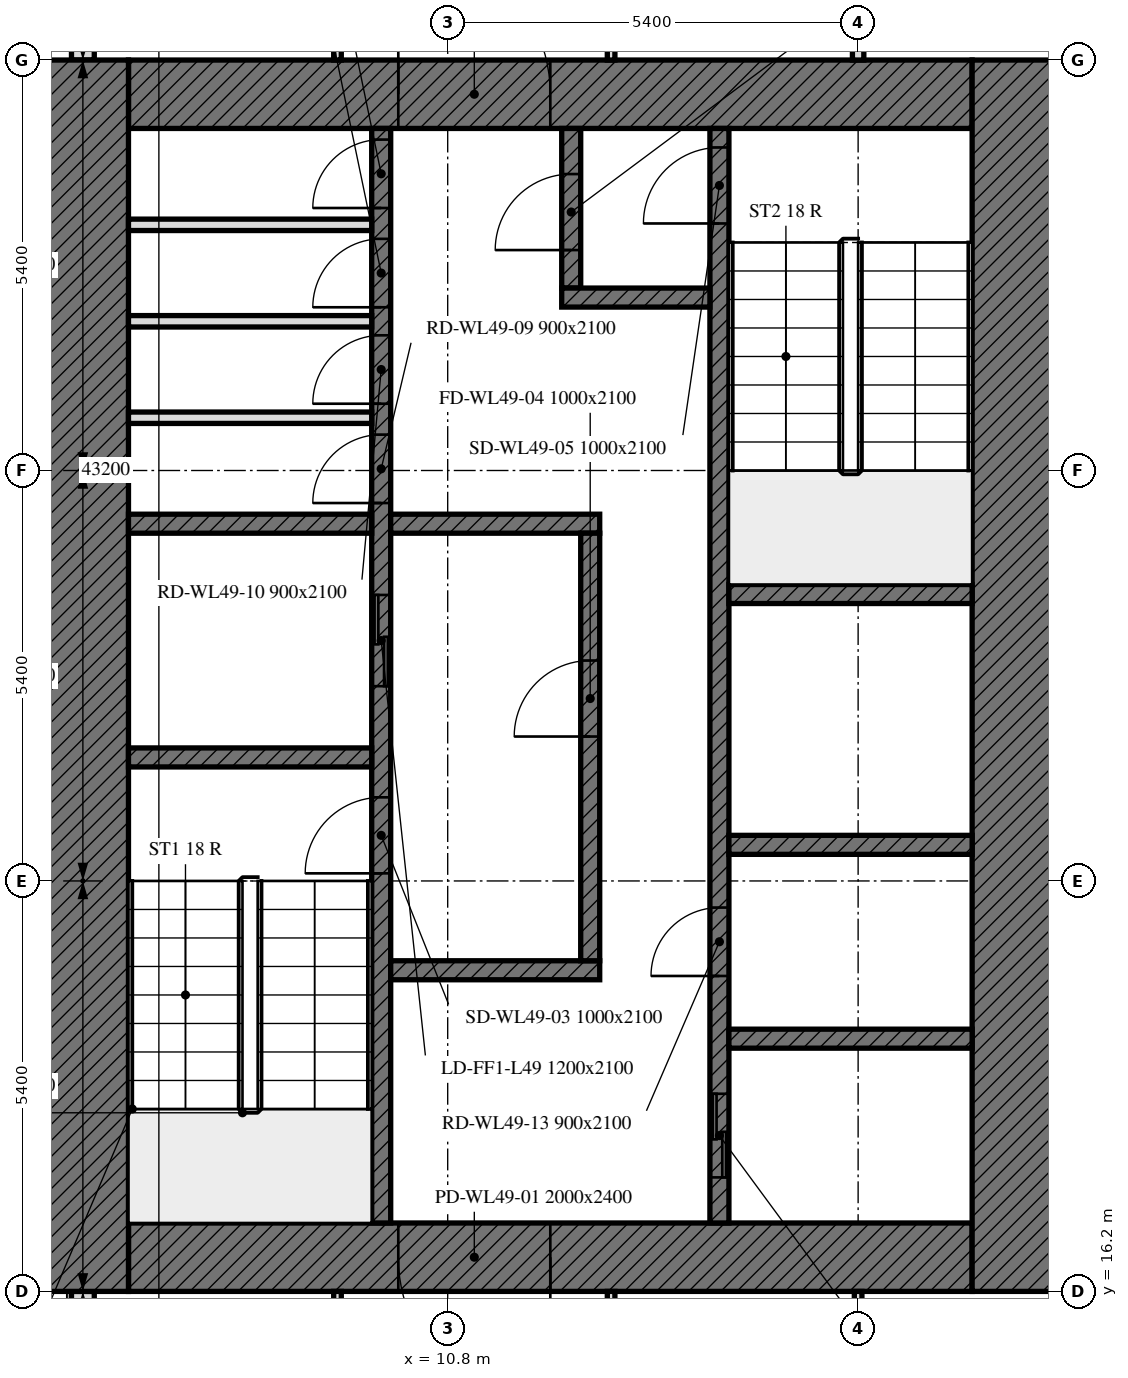
"""IFC4 building model, lengths in metres.
Left out: names, types, materials, properties, quantities, classifications, styles, units other than length and angle.
Written with IfcOpenShell. Run it as: python <this file> out.ifc"""

import sys

from ifc_helpers import new_model, si_unit, direction, frame, frame_2d, origin, place, context, subcontext, project, spatial, rectangle, extrude, element, fill, save


model = new_model("IFC4")
c1 = context("Model", 3, precision=1e-05, world=origin(), true_north=direction((0.0, 1.0)))
c2 = subcontext(c1, "Body", "Model", "MODEL_VIEW")
j1 = project(units=[si_unit("LENGTHUNIT", "METRE"), si_unit("PLANEANGLEUNIT", "RADIAN")], contexts=[c1])
p1 = place(None, origin())
s1 = spatial("IfcSite", under=j1, at=p1, CompositionType="ELEMENT")
p2 = place(p1, origin())
s2 = spatial("IfcBuilding", under=s1, at=p2, CompositionType="ELEMENT")
p3 = place(p2, frame((0.0, 0.0, 200.5)))
s3 = spatial("IfcBuildingStorey", under=s2, at=p3, CompositionType="ELEMENT", Elevation=200.5)
p4 = place(p3, frame((6.0, 43.014, 0.0), z_axis=(0.0, 0.0, 1.0), x_axis=(0.0, -1.0, 0.0)))
e1 = element("IfcWall", 1, at=p4, inside=s3, PredefinedType="SOLIDWALL", context=c2, shape_type="SweptSolid", body=[
    extrude(rectangle(XDim=10.614, YDim=0.3, at=frame_2d((5.307, 0.0))), origin(), (0.0, 0.0, 1.0), 3.0),
])
p5 = place(p4, frame((1.164, 0.0, 0.9)))
e2 = element("IfcOpeningElement", 2, at=p5, cuts=e1, PredefinedType="OPENING", context=c2, shape_type="SweptSolid", body=[
    extrude(rectangle(XDim=1.1, YDim=1.7, at=frame_2d((0.55, 0.85))), frame((0.0, 0.16, 0.0), z_axis=(0.0, -1.0, 0.0), x_axis=(1.0, 0.0, 0.0)), (0.0, 0.0, 1.0), 0.32),
])
p6 = place(p4, frame((2.764, 0.0, 0.9)))
e3 = element("IfcOpeningElement", 3, at=p6, cuts=e1, PredefinedType="OPENING", context=c2, shape_type="SweptSolid", body=[
    extrude(rectangle(XDim=1.1, YDim=1.7, at=frame_2d((0.55, 0.85))), frame((0.0, 0.16, 0.0), z_axis=(0.0, -1.0, 0.0), x_axis=(1.0, 0.0, 0.0)), (0.0, 0.0, 1.0), 0.32),
])
p7 = place(p4, frame((6.564, 0.0, 0.9)))
e4 = element("IfcOpeningElement", 4, at=p7, cuts=e1, PredefinedType="OPENING", context=c2, shape_type="SweptSolid", body=[
    extrude(rectangle(XDim=1.1, YDim=1.7, at=frame_2d((0.55, 0.85))), frame((0.0, 0.16, 0.0), z_axis=(0.0, -1.0, 0.0), x_axis=(1.0, 0.0, 0.0)), (0.0, 0.0, 1.0), 0.32),
])
p8 = place(p4, frame((8.164, 0.0, 0.9)))
e5 = element("IfcOpeningElement", 5, at=p8, cuts=e1, PredefinedType="OPENING", context=c2, shape_type="SweptSolid", body=[
    extrude(rectangle(XDim=1.1, YDim=1.7, at=frame_2d((0.55, 0.85))), frame((0.0, 0.16, 0.0), z_axis=(0.0, -1.0, 0.0), x_axis=(1.0, 0.0, 0.0)), (0.0, 0.0, 1.0), 0.32),
])
p9 = place(p3, frame((6.0, 16.2, 0.0), z_axis=(0.0, 0.0, 1.0), x_axis=(0.0, -1.0, 0.0)))
e6 = element("IfcWall", 6, at=p9, inside=s3, PredefinedType="SOLIDWALL", context=c2, shape_type="SweptSolid", body=[
    extrude(rectangle(XDim=5.214, YDim=0.3, at=frame_2d((2.607, 0.0))), origin(), (0.0, 0.0, 1.0), 3.0),
])
p10 = place(p9, frame((1.35, 0.0, 0.9)))
e7 = element("IfcOpeningElement", 7, at=p10, cuts=e6, PredefinedType="OPENING", context=c2, shape_type="SweptSolid", body=[
    extrude(rectangle(XDim=1.1, YDim=1.7, at=frame_2d((0.55, 0.85))), frame((0.0, 0.16, 0.0), z_axis=(0.0, -1.0, 0.0), x_axis=(1.0, 0.0, 0.0)), (0.0, 0.0, 1.0), 0.32),
])
p11 = place(p9, frame((2.95, 0.0, 0.9)))
e8 = element("IfcOpeningElement", 8, at=p11, cuts=e6, PredefinedType="OPENING", context=c2, shape_type="SweptSolid", body=[
    extrude(rectangle(XDim=1.1, YDim=1.7, at=frame_2d((0.55, 0.85))), frame((0.0, 0.16, 0.0), z_axis=(0.0, -1.0, 0.0), x_axis=(1.0, 0.0, 0.0)), (0.0, 0.0, 1.0), 0.32),
])
p12 = place(p3, frame((17.7, 16.65, 0.0), z_axis=(0.0, 0.0, 1.0), x_axis=(-1.0, 0.0, 0.0)))
e9 = element("IfcWall", 9, at=p12, inside=s3, PredefinedType="SOLIDWALL", context=c2, shape_type="SweptSolid", body=[
    extrude(rectangle(XDim=11.1, YDim=0.9, at=frame_2d((5.55, 0.0))), origin(), (0.0, 0.0, 1.0), 3.0),
])
p13 = place(p12, frame((5.55, 0.0, 0.0)))
e10 = element("IfcOpeningElement", 10, at=p13, cuts=e9, PredefinedType="OPENING", context=c2, shape_type="SweptSolid", body=[
    extrude(rectangle(XDim=2.0, YDim=2.4, at=frame_2d((1.0, 1.2))), frame((0.0, 0.45, 0.0), z_axis=(0.0, -1.0, 0.0), x_axis=(1.0, 0.0, 0.0)), (0.0, 0.0, 1.0), 0.9),
])
p14 = place(p3, frame((6.6, 31.95, 0.0), z_axis=(0.0, 0.0, 1.0), x_axis=(1.0, 0.0, 0.0)))
e11 = element("IfcWall", 11, at=p14, inside=s3, PredefinedType="SOLIDWALL", context=c2, shape_type="SweptSolid", body=[
    extrude(rectangle(XDim=11.1, YDim=0.9, at=frame_2d((5.55, 0.0))), origin(), (0.0, 0.0, 1.0), 3.0),
])
p15 = place(p14, frame((3.55, 0.0, 0.0)))
e12 = element("IfcOpeningElement", 12, at=p15, cuts=e11, PredefinedType="OPENING", context=c2, shape_type="SweptSolid", body=[
    extrude(rectangle(XDim=2.0, YDim=2.4, at=frame_2d((1.0, 1.2))), frame((0.0, 0.45, 0.0), z_axis=(0.0, -1.0, 0.0), x_axis=(1.0, 0.0, 0.0)), (0.0, 0.0, 1.0), 0.9),
])
for number, where, z_axis, x_axis in (
    (13, (6.0, 16.2, 0.0), (0.0, 0.0, 1.0), (0.0, 1.0, 0.0)),
    (14, (18.3, 32.4, 0.0), (0.0, 0.0, 1.0), (0.0, -1.0, 0.0)),
):
    element("IfcWall", number, at=place(p3, frame(where, z_axis=z_axis, x_axis=x_axis)), inside=s3, PredefinedType="SOLIDWALL", context=c2, shape_type="SweptSolid", body=[
        extrude(rectangle(XDim=16.2, YDim=1.2, at=frame_2d((8.1, 0.0))), origin(), (0.0, 0.0, 1.0), 3.0),
    ])
p16 = place(p3, frame((9.925, 17.1, 0.0), z_axis=(0.0, 0.0, 1.0), x_axis=(0.0, 1.0, 0.0)))
e15 = element("IfcWall", 15, at=p16, inside=s3, PredefinedType="SOLIDWALL", context=c2, shape_type="SweptSolid", body=[
    extrude(rectangle(XDim=14.4, YDim=0.25, at=frame_2d((7.2, 0.0))), origin(), (0.0, 0.0, 1.0), 3.0),
])
p17 = place(p16, frame((4.6, 0.0, 0.0)))
e16 = element("IfcOpeningElement", 16, at=p17, cuts=e15, PredefinedType="OPENING", context=c2, shape_type="SweptSolid", body=[
    extrude(rectangle(XDim=1.0, YDim=2.1, at=frame_2d((0.5, 1.05))), frame((0.0, 0.125, 0.0), z_axis=(0.0, -1.0, 0.0), x_axis=(1.0, 0.0, 0.0)), (0.0, 0.0, 1.0), 0.25),
])
p18 = place(p16, frame((7.062, 0.0, 0.0)))
e17 = element("IfcOpeningElement", 17, at=p18, cuts=e15, PredefinedType="OPENING", context=c2, shape_type="SweptSolid", body=[
    extrude(rectangle(XDim=1.2, YDim=2.1, at=frame_2d((0.6, 1.05))), frame((0.0, 0.125, 0.0), z_axis=(0.0, -1.0, 0.0), x_axis=(1.0, 0.0, 0.0)), (0.0, 0.0, 1.0), 0.25),
])
p19 = place(p16, frame((9.472, 0.0, 0.0)))
e18 = element("IfcOpeningElement", 18, at=p19, cuts=e15, PredefinedType="OPENING", context=c2, shape_type="SweptSolid", body=[
    extrude(rectangle(XDim=0.9, YDim=2.1, at=frame_2d((0.45, 1.05))), frame((0.0, 0.125, 0.0), z_axis=(0.0, -1.0, 0.0), x_axis=(1.0, 0.0, 0.0)), (0.0, 0.0, 1.0), 0.25),
])
p20 = place(p16, frame((10.779, 0.0, 0.0)))
e19 = element("IfcOpeningElement", 19, at=p20, cuts=e15, PredefinedType="OPENING", context=c2, shape_type="SweptSolid", body=[
    extrude(rectangle(XDim=0.9, YDim=2.1, at=frame_2d((0.45, 1.05))), frame((0.0, 0.125, 0.0), z_axis=(0.0, -1.0, 0.0), x_axis=(1.0, 0.0, 0.0)), (0.0, 0.0, 1.0), 0.25),
])
p21 = place(p16, frame((12.048, 0.0, 0.0)))
e20 = element("IfcOpeningElement", 20, at=p21, cuts=e15, PredefinedType="OPENING", context=c2, shape_type="SweptSolid", body=[
    extrude(rectangle(XDim=0.9, YDim=2.1, at=frame_2d((0.45, 1.05))), frame((0.0, 0.125, 0.0), z_axis=(0.0, -1.0, 0.0), x_axis=(1.0, 0.0, 0.0)), (0.0, 0.0, 1.0), 0.25),
])
p22 = place(p16, frame((13.354, 0.0, 0.0)))
e21 = element("IfcOpeningElement", 21, at=p22, cuts=e15, PredefinedType="OPENING", context=c2, shape_type="SweptSolid", body=[
    extrude(rectangle(XDim=0.9, YDim=2.1, at=frame_2d((0.45, 1.05))), frame((0.0, 0.125, 0.0), z_axis=(0.0, -1.0, 0.0), x_axis=(1.0, 0.0, 0.0)), (0.0, 0.0, 1.0), 0.25),
])
p23 = place(p3, frame((14.375, 17.1, 0.0), z_axis=(0.0, 0.0, 1.0), x_axis=(0.0, 1.0, 0.0)))
e22 = element("IfcWall", 22, at=p23, inside=s3, PredefinedType="SOLIDWALL", context=c2, shape_type="SweptSolid", body=[
    extrude(rectangle(XDim=14.4, YDim=0.25, at=frame_2d((7.2, 0.0))), origin(), (0.0, 0.0, 1.0), 3.0),
])
p24 = place(p23, frame((13.15, 0.0, 0.0)))
e23 = element("IfcOpeningElement", 23, at=p24, cuts=e22, PredefinedType="OPENING", context=c2, shape_type="SweptSolid", body=[
    extrude(rectangle(XDim=1.0, YDim=2.1, at=frame_2d((0.5, 1.05))), frame((0.0, 0.125, 0.0), z_axis=(0.0, -1.0, 0.0), x_axis=(1.0, 0.0, 0.0)), (0.0, 0.0, 1.0), 0.25),
])
p25 = place(p23, frame((0.6, 0.0, 0.0)))
e24 = element("IfcOpeningElement", 24, at=p25, cuts=e22, PredefinedType="OPENING", context=c2, shape_type="SweptSolid", body=[
    extrude(rectangle(XDim=1.1, YDim=2.1, at=frame_2d((0.55, 1.05))), frame((0.0, 0.125, 0.0), z_axis=(0.0, -1.0, 0.0), x_axis=(1.0, 0.0, 0.0)), (0.0, 0.0, 1.0), 0.25),
])
p26 = place(p23, frame((3.25, 0.0, 0.0)))
e25 = element("IfcOpeningElement", 25, at=p26, cuts=e22, PredefinedType="OPENING", context=c2, shape_type="SweptSolid", body=[
    extrude(rectangle(XDim=0.9, YDim=2.1, at=frame_2d((0.45, 1.05))), frame((0.0, 0.125, 0.0), z_axis=(0.0, -1.0, 0.0), x_axis=(1.0, 0.0, 0.0)), (0.0, 0.0, 1.0), 0.25),
])
for number, where, z_axis, x_axis in (
    (26, (6.6, 23.225, 0.0), (0.0, 0.0, 1.0), (1.0, 0.0, 0.0)),
    (27, (14.5, 25.375, 0.0), (0.0, 0.0, 1.0), (1.0, 0.0, 0.0)),
    (28, (14.5, 22.075, 0.0), (0.0, 0.0, 1.0), (1.0, 0.0, 0.0)),
    (29, (6.6, 26.3, 0.0), (0.0, 0.0, 1.0), (1.0, 0.0, 0.0)),
):
    element("IfcWall", number, at=place(p3, frame(where, z_axis=z_axis, x_axis=x_axis)), inside=s3, PredefinedType="SOLIDWALL", context=c2, shape_type="SweptSolid", body=[
        extrude(rectangle(XDim=3.2, YDim=0.25, at=frame_2d((1.6, 0.0))), origin(), (0.0, 0.0, 1.0), 3.0),
    ])
for number, where, z_axis, x_axis in (
    (30, (10.05, 26.3, 0.0), (0.0, 0.0, 1.0), (1.0, 0.0, 0.0)),
    (31, (10.05, 20.425, 0.0), (0.0, 0.0, 1.0), (1.0, 0.0, 0.0)),
):
    element("IfcWall", number, at=place(p3, frame(where, z_axis=z_axis, x_axis=x_axis)), inside=s3, PredefinedType="SOLIDWALL", context=c2, shape_type="SweptSolid", body=[
        extrude(rectangle(XDim=2.75, YDim=0.25, at=frame_2d((1.375, 0.0))), origin(), (0.0, 0.0, 1.0), 3.0),
    ])
p27 = place(p3, frame((12.425, 29.4, 0.0), z_axis=(0.0, 0.0, 1.0), x_axis=(0.0, 1.0, 0.0)))
e32 = element("IfcWall", 32, at=p27, inside=s3, PredefinedType="SOLIDWALL", context=c2, shape_type="SweptSolid", body=[
    extrude(rectangle(XDim=2.1, YDim=0.25, at=frame_2d((1.05, 0.0))), origin(), (0.0, 0.0, 1.0), 3.0),
])
p28 = place(p27, frame((0.5, 0.0, 0.0)))
e33 = element("IfcOpeningElement", 33, at=p28, cuts=e32, PredefinedType="OPENING", context=c2, shape_type="SweptSolid", body=[
    extrude(rectangle(XDim=1.0, YDim=2.1, at=frame_2d((0.5, 1.05))), frame((0.0, 0.125, 0.0), z_axis=(0.0, -1.0, 0.0), x_axis=(1.0, 0.0, 0.0)), (0.0, 0.0, 1.0), 0.25),
])
p29 = place(p3, frame((12.3, 29.275, 0.0), z_axis=(0.0, 0.0, 1.0), x_axis=(1.0, 0.0, 0.0)))
e34 = element("IfcWall", 34, at=p29, inside=s3, PredefinedType="SOLIDWALL", context=c2, shape_type="SweptSolid", body=[
    extrude(rectangle(XDim=1.95, YDim=0.25, at=frame_2d((0.975, 0.0))), origin(), (0.0, 0.0, 1.0), 3.0),
])
p30 = place(p3, frame((12.675, 20.55, 0.0), z_axis=(0.0, 0.0, 1.0), x_axis=(0.0, 1.0, 0.0)))
e35 = element("IfcWall", 35, at=p30, inside=s3, PredefinedType="SOLIDWALL", context=c2, shape_type="SweptSolid", body=[
    extrude(rectangle(XDim=5.625, YDim=0.25, at=frame_2d((2.812, 0.0))), origin(), (0.0, 0.0, 1.0), 3.0),
])
p31 = place(p30, frame((2.95, 0.0, 0.0)))
e36 = element("IfcOpeningElement", 36, at=p31, cuts=e35, PredefinedType="OPENING", context=c2, shape_type="SweptSolid", body=[
    extrude(rectangle(XDim=1.0, YDim=2.1, at=frame_2d((0.5, 1.05))), frame((0.0, 0.125, 0.0), z_axis=(0.0, -1.0, 0.0), x_axis=(1.0, 0.0, 0.0)), (0.0, 0.0, 1.0), 0.25),
])
p32 = place(p3, frame((14.5, 19.525, 0.0), z_axis=(0.0, 0.0, 1.0), x_axis=(1.0, 0.0, 0.0)))
e37 = element("IfcWall", 37, at=p32, inside=s3, PredefinedType="SOLIDWALL", context=c2, shape_type="SweptSolid", body=[
    extrude(rectangle(XDim=3.2, YDim=0.25, at=frame_2d((1.6, 0.0))), origin(), (0.0, 0.0, 1.0), 3.0),
])
for number, where, z_axis, x_axis in (
    (38, (6.6, 27.694, 0.0), (0.0, 0.0, 1.0), (1.0, 0.0, 0.0)),
    (39, (6.6, 28.963, 0.0), (0.0, 0.0, 1.0), (1.0, 0.0, 0.0)),
    (40, (6.6, 30.232, 0.0), (0.0, 0.0, 1.0), (1.0, 0.0, 0.0)),
):
    element("IfcWall", number, at=place(p3, frame(where, z_axis=z_axis, x_axis=x_axis)), inside=s3, PredefinedType="PARTITIONING", context=c2, shape_type="SweptSolid", body=[
        extrude(rectangle(XDim=3.2, YDim=0.15, at=frame_2d((1.6, 0.0))), origin(), (0.0, 0.0, 1.0), 3.0),
    ])
p33 = place(p3, frame((16.2, 37.38, 0.0), z_axis=(0.0, 0.0, 1.0), x_axis=(0.0, -1.0, 0.0)))
e41 = element("IfcWall", 41, at=p33, inside=s3, PredefinedType="PARTITIONING", context=c2, shape_type="SweptSolid", body=[
    extrude(rectangle(XDim=4.98, YDim=0.15, at=frame_2d((2.49, 0.0))), origin(), (0.0, 0.0, 1.0), 2.4),
])
for number, where, z_axis, x_axis in (
    (42, (9.35, 40.425, 0.0), (0.0, 0.0, 1.0), (0.0, -1.0, 0.0)),
    (43, (12.95, 32.4, 0.0), (0.0, 0.0, 1.0), (0.0, 1.0, 0.0)),
):
    element("IfcWall", number, at=place(p3, frame(where, z_axis=z_axis, x_axis=x_axis)), inside=s3, PredefinedType="PARTITIONING", context=c2, shape_type="SweptSolid", body=[
        extrude(rectangle(XDim=8.025, YDim=0.1, at=frame_2d((4.013, 0.0))), origin(), (0.0, 0.0, 1.0), 3.0),
    ])
for number, where, z_axis, x_axis in (
    (44, (16.2, 16.2, 0.0), (0.0, 0.0, 1.0), (0.0, -1.0, 0.0)),
    (45, (9.35, 16.2, 0.0), (0.0, 0.0, 1.0), (0.0, -1.0, 0.0)),
    (46, (12.95, 13.575, 0.0), (0.0, 0.0, 1.0), (0.0, 1.0, 0.0)),
):
    element("IfcWall", number, at=place(p3, frame(where, z_axis=z_axis, x_axis=x_axis)), inside=s3, PredefinedType="PARTITIONING", context=c2, shape_type="SweptSolid", body=[
        extrude(rectangle(XDim=2.625, YDim=0.1, at=frame_2d((1.312, 0.0))), origin(), (0.0, 0.0, 1.0), 3.0),
    ])
p34 = place(p13, origin())
e47 = element("IfcDoor", 47, at=p34, inside=s3, OperationType="DOUBLE_DOOR_SINGLE_SWING", PredefinedType="DOOR", context=c2, shape_type="SweptSolid", body=[
    extrude(rectangle(XDim=2.0, YDim=2.4, at=frame_2d((1.0, 1.2))), frame((0.0, 0.025, 0.0), z_axis=(0.0, -1.0, 0.0), x_axis=(1.0, 0.0, 0.0)), (0.0, 0.0, 1.0), 0.05),
])
fill(e10, e47)
p35 = place(p15, origin())
e48 = element("IfcDoor", 48, at=p35, inside=s3, OperationType="DOUBLE_DOOR_SINGLE_SWING", PredefinedType="DOOR", context=c2, shape_type="SweptSolid", body=[
    extrude(rectangle(XDim=2.0, YDim=2.4, at=frame_2d((1.0, 1.2))), frame((0.0, 0.025, 0.0), z_axis=(0.0, -1.0, 0.0), x_axis=(1.0, 0.0, 0.0)), (0.0, 0.0, 1.0), 0.05),
])
fill(e12, e48)
p36 = place(p17, origin())
e49 = element("IfcDoor", 49, at=p36, inside=s3, OperationType="SINGLE_SWING_LEFT", PredefinedType="DOOR", context=c2, shape_type="SweptSolid", body=[
    extrude(rectangle(XDim=1.0, YDim=2.1, at=frame_2d((0.5, 1.05))), frame((0.0, 0.025, 0.0), z_axis=(0.0, -1.0, 0.0), x_axis=(1.0, 0.0, 0.0)), (0.0, 0.0, 1.0), 0.05),
])
fill(e16, e49)
p37 = place(p31, origin())
e50 = element("IfcDoor", 50, at=p37, inside=s3, OperationType="SINGLE_SWING_LEFT", PredefinedType="DOOR", context=c2, shape_type="SweptSolid", body=[
    extrude(rectangle(XDim=1.0, YDim=2.1, at=frame_2d((0.5, 1.05))), frame((0.0, 0.025, 0.0), z_axis=(0.0, -1.0, 0.0), x_axis=(1.0, 0.0, 0.0)), (0.0, 0.0, 1.0), 0.05),
])
fill(e36, e50)
p38 = place(p24, origin())
e51 = element("IfcDoor", 51, at=p38, inside=s3, OperationType="SINGLE_SWING_LEFT", PredefinedType="DOOR", context=c2, shape_type="SweptSolid", body=[
    extrude(rectangle(XDim=1.0, YDim=2.1, at=frame_2d((0.5, 1.05))), frame((0.0, 0.025, 0.0), z_axis=(0.0, -1.0, 0.0), x_axis=(1.0, 0.0, 0.0)), (0.0, 0.0, 1.0), 0.05),
])
fill(e23, e51)
p39 = place(p28, origin())
e52 = element("IfcDoor", 52, at=p39, inside=s3, OperationType="SINGLE_SWING_LEFT", PredefinedType="DOOR", context=c2, shape_type="SweptSolid", body=[
    extrude(rectangle(XDim=1.0, YDim=2.1, at=frame_2d((0.5, 1.05))), frame((0.0, 0.025, 0.0), z_axis=(0.0, -1.0, 0.0), x_axis=(1.0, 0.0, 0.0)), (0.0, 0.0, 1.0), 0.05),
])
fill(e33, e52)
p40 = place(p18, origin())
e53 = element("IfcDoor", 53, at=p40, inside=s3, OperationType="DOUBLE_DOOR_SLIDING", PredefinedType="DOOR", context=c2, shape_type="SweptSolid", body=[
    extrude(rectangle(XDim=1.2, YDim=2.1, at=frame_2d((0.6, 1.05))), frame((0.0, 0.025, 0.0), z_axis=(0.0, -1.0, 0.0), x_axis=(1.0, 0.0, 0.0)), (0.0, 0.0, 1.0), 0.05),
])
fill(e17, e53)
p41 = place(p25, origin())
e54 = element("IfcDoor", 54, at=p41, inside=s3, OperationType="DOUBLE_DOOR_SLIDING", PredefinedType="DOOR", context=c2, shape_type="SweptSolid", body=[
    extrude(rectangle(XDim=1.1, YDim=2.1, at=frame_2d((0.55, 1.05))), frame((0.0, 0.025, 0.0), z_axis=(0.0, -1.0, 0.0), x_axis=(1.0, 0.0, 0.0)), (0.0, 0.0, 1.0), 0.05),
])
fill(e24, e54)
p42 = place(p19, origin())
e55 = element("IfcDoor", 55, at=p42, inside=s3, OperationType="SINGLE_SWING_LEFT", PredefinedType="DOOR", context=c2, shape_type="SweptSolid", body=[
    extrude(rectangle(XDim=0.9, YDim=2.1, at=frame_2d((0.45, 1.05))), frame((0.0, 0.025, 0.0), z_axis=(0.0, -1.0, 0.0), x_axis=(1.0, 0.0, 0.0)), (0.0, 0.0, 1.0), 0.05),
])
fill(e18, e55)
p43 = place(p20, origin())
e56 = element("IfcDoor", 56, at=p43, inside=s3, OperationType="SINGLE_SWING_LEFT", PredefinedType="DOOR", context=c2, shape_type="SweptSolid", body=[
    extrude(rectangle(XDim=0.9, YDim=2.1, at=frame_2d((0.45, 1.05))), frame((0.0, 0.025, 0.0), z_axis=(0.0, -1.0, 0.0), x_axis=(1.0, 0.0, 0.0)), (0.0, 0.0, 1.0), 0.05),
])
fill(e19, e56)
p44 = place(p21, origin())
e57 = element("IfcDoor", 57, at=p44, inside=s3, OperationType="SINGLE_SWING_LEFT", PredefinedType="DOOR", context=c2, shape_type="SweptSolid", body=[
    extrude(rectangle(XDim=0.9, YDim=2.1, at=frame_2d((0.45, 1.05))), frame((0.0, 0.025, 0.0), z_axis=(0.0, -1.0, 0.0), x_axis=(1.0, 0.0, 0.0)), (0.0, 0.0, 1.0), 0.05),
])
fill(e20, e57)
p45 = place(p22, origin())
e58 = element("IfcDoor", 58, at=p45, inside=s3, OperationType="SINGLE_SWING_LEFT", PredefinedType="DOOR", context=c2, shape_type="SweptSolid", body=[
    extrude(rectangle(XDim=0.9, YDim=2.1, at=frame_2d((0.45, 1.05))), frame((0.0, 0.025, 0.0), z_axis=(0.0, -1.0, 0.0), x_axis=(1.0, 0.0, 0.0)), (0.0, 0.0, 1.0), 0.05),
])
fill(e21, e58)
p46 = place(p26, origin())
e59 = element("IfcDoor", 59, at=p46, inside=s3, OperationType="SINGLE_SWING_LEFT", PredefinedType="DOOR", context=c2, shape_type="SweptSolid", body=[
    extrude(rectangle(XDim=0.9, YDim=2.1, at=frame_2d((0.45, 1.05))), frame((0.0, 0.025, 0.0), z_axis=(0.0, -1.0, 0.0), x_axis=(1.0, 0.0, 0.0)), (0.0, 0.0, 1.0), 0.05),
])
fill(e25, e59)
save(model, sys.argv[1])
